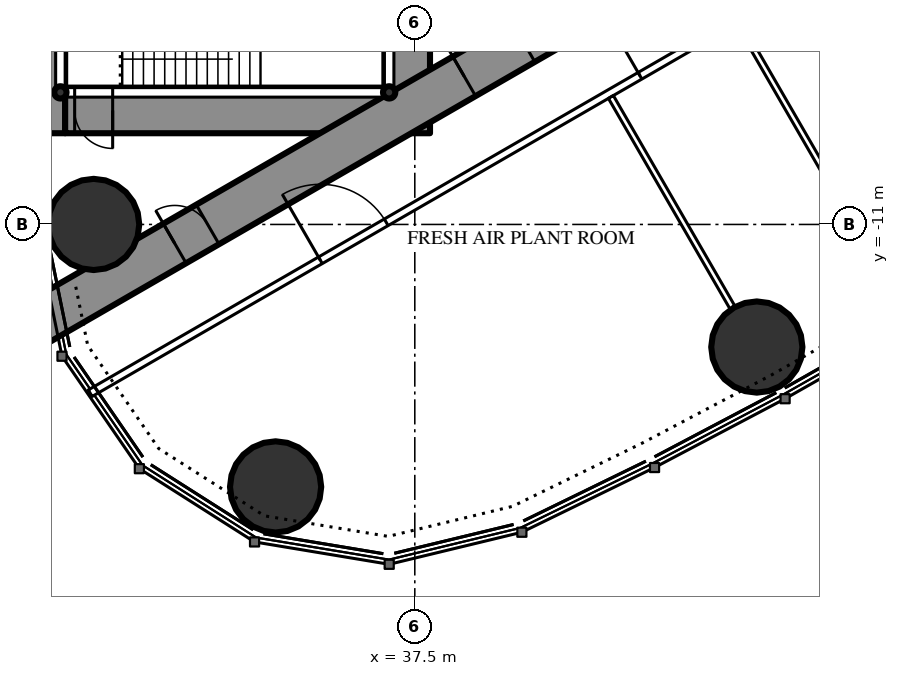
"""IFC4 building model, lengths in metres.
Left out: names, types, materials, properties, quantities, classifications, styles, units other than length and angle.
Written with IfcOpenShell. Run it as: python <this file> out.ifc"""

import sys

from ifc_helpers import new_model, si_unit, direction, frame, frame_2d, origin, origin_2d, place, context, subcontext, project, spatial, rectangle, circle, hollow_circle, extrude, element, fill, save


model = new_model("IFC4")
c1 = context("Model", 3, precision=1e-05, world=origin(), true_north=direction((0.0, 1.0)))
c2 = subcontext(c1, "Body", "Model", "MODEL_VIEW")
j1 = project(units=[si_unit("LENGTHUNIT", "METRE"), si_unit("PLANEANGLEUNIT", "RADIAN")], contexts=[c1])
p1 = place(None, origin())
s1 = spatial("IfcSite", under=j1, at=p1, CompositionType="ELEMENT")
p2 = place(p1, origin())
s2 = spatial("IfcBuilding", under=s1, at=p2, CompositionType="ELEMENT")
p3 = place(p2, frame((0.0, 0.0, 268.3)))
s3 = spatial("IfcBuildingStorey", under=s2, at=p3, CompositionType="ELEMENT", Elevation=268.3)
for number, where, z_axis, x_axis in (
    (1, (33.837, -17.906, 0.0), (0.0, 0.0, 1.0), (1.0, 0.0, 0.0)),
    (2, (29.05, -11.0, 0.0), (0.0, 0.0, 1.0), (1.0, 0.0, 0.0)),
    (3, (46.499, -14.226, 0.0), (0.0, 0.0, 1.0), (1.0, 0.0, 0.0)),
):
    element("IfcColumn", number, at=place(p3, frame(where, z_axis=z_axis, x_axis=x_axis)), inside=s3, PredefinedType="COLUMN", context=c2, shape_type="SweptSolid", body=[
        extrude(circle(Radius=1.2, at=origin_2d()), origin(), (0.0, 0.0, 1.0), 5.0),
    ])
p4 = place(p3, frame((27.9, -8.6, 0.0), z_axis=(0.0, 0.0, 1.0), x_axis=(0.0, 1.0, 0.0)))
e4 = element("IfcWall", 4, at=p4, inside=s3, PredefinedType="SHEAR", context=c2, shape_type="SweptSolid", body=[
    extrude(rectangle(XDim=17.2, YDim=0.8, at=frame_2d((8.6, 0.0))), origin(), (0.0, 0.0, 1.0), 5.0),
])
p5 = place(p4, frame((9.35, 0.0, 0.0)))
e5 = element("IfcOpeningElement", 5, at=p5, cuts=e4, PredefinedType="OPENING", context=c2, shape_type="SweptSolid", body=[
    extrude(rectangle(XDim=0.9, YDim=2.2, at=frame_2d((0.45, 1.1))), frame((0.0, 0.41, 0.0), z_axis=(0.0, -1.0, 0.0), x_axis=(1.0, 0.0, 0.0)), (0.0, 0.0, 1.0), 0.82),
])
p6 = place(p3, frame((37.3, -8.6, 0.0), z_axis=(0.0, 0.0, 1.0), x_axis=(0.0, 1.0, 0.0)))
e6 = element("IfcWall", 6, at=p6, inside=s3, PredefinedType="SHEAR", context=c2, shape_type="SweptSolid", body=[
    extrude(rectangle(XDim=17.2, YDim=1.2, at=frame_2d((8.6, 0.0))), origin(), (0.0, 0.0, 1.0), 5.0),
])
p7 = place(p6, frame((7.7, 0.0, 0.0)))
e7 = element("IfcOpeningElement", 7, at=p7, cuts=e6, PredefinedType="OPENING", context=c2, shape_type="SweptSolid", body=[
    extrude(rectangle(XDim=1.8, YDim=2.2, at=frame_2d((0.9, 1.1))), frame((0.0, 0.61, 0.0), z_axis=(0.0, -1.0, 0.0), x_axis=(1.0, 0.0, 0.0)), (0.0, 0.0, 1.0), 1.22),
])
p8 = place(p3, frame((28.3, -8.0, 0.0), z_axis=(0.0, 0.0, 1.0), x_axis=(1.0, 0.0, 0.0)))
e8 = element("IfcWall", 8, at=p8, inside=s3, PredefinedType="SHEAR", context=c2, shape_type="SweptSolid", body=[
    extrude(rectangle(XDim=8.4, YDim=1.2, at=frame_2d((4.2, 0.0))), origin(), (0.0, 0.0, 1.0), 5.0),
])
p9 = place(p8, frame((0.25, 0.0, 0.0)))
e9 = element("IfcOpeningElement", 9, at=p9, cuts=e8, PredefinedType="OPENING", context=c2, shape_type="SweptSolid", body=[
    extrude(rectangle(XDim=1.0, YDim=2.2, at=frame_2d((0.5, 1.1))), frame((0.0, 0.61, 0.0), z_axis=(0.0, -1.0, 0.0), x_axis=(1.0, 0.0, 0.0)), (0.0, 0.0, 1.0), 1.22),
])
p10 = place(p3, frame((27.2, -13.8, 0.0), z_axis=(0.0, 0.0, 1.0), x_axis=(0.866027159892, 0.499996958321, 0.0)))
e10 = element("IfcWall", 10, at=p10, inside=s3, PredefinedType="SHEAR", context=c2, shape_type="SweptSolid", body=[
    extrude(rectangle(XDim=27.947, YDim=1.2, at=frame_2d((13.973, 0.0))), origin(), (0.0, 0.0, 1.0), 5.0),
])
p11 = place(p10, frame((4.6, 0.0, 0.0)))
e11 = element("IfcOpeningElement", 11, at=p11, cuts=e10, PredefinedType="OPENING", context=c2, shape_type="SweptSolid", body=[
    extrude(rectangle(XDim=1.0, YDim=2.2, at=frame_2d((0.5, 1.1))), frame((0.0, 0.61, 0.0), z_axis=(0.0, -1.0, 0.0), x_axis=(1.0, 0.0, 0.0)), (0.0, 0.0, 1.0), 1.22),
])
p12 = place(p10, frame((13.395, 0.0, 0.0)))
e12 = element("IfcOpeningElement", 12, at=p12, cuts=e10, PredefinedType="OPENING", context=c2, shape_type="SweptSolid", body=[
    extrude(rectangle(XDim=1.8, YDim=2.2, at=frame_2d((0.9, 1.1))), frame((0.0, 0.61, 0.0), z_axis=(0.0, -1.0, 0.0), x_axis=(1.0, 0.0, 0.0)), (0.0, 0.0, 1.0), 1.22),
])
for number, where, z_axis, x_axis in (
    (13, (28.175, -7.525, 5.0), (0.0, 0.0, 1.0), (1.0, 0.0, 0.0)),
    (14, (36.825, -7.525, 5.0), (0.0, 0.0, 1.0), (1.0, 0.0, 0.0)),
):
    element("IfcColumn", number, at=place(p3, frame(where, z_axis=z_axis, x_axis=x_axis)), inside=s3, PredefinedType="COLUMN", context=c2, shape_type="SweptSolid", body=[
        extrude(hollow_circle(Radius=0.162, WallThickness=0.012, at=origin_2d()), origin(), (0.0, 0.0, 1.0), 3.0),
    ])
for number, where, z_axis, x_axis in (
    (15, (28.175, -7.422, 5.0), (0.0, 0.0, 1.0), (0.0, 1.0, 0.0)),
    (16, (36.825, -7.422, 5.0), (0.0, 0.0, 1.0), (0.0, 1.0, 0.0)),
):
    element("IfcWall", number, at=place(p3, frame(where, z_axis=z_axis, x_axis=x_axis)), inside=s3, PredefinedType="SOLIDWALL", context=c2, shape_type="SweptSolid", body=[
        extrude(rectangle(XDim=3.144, YDim=0.25, at=frame_2d((1.572, 0.0))), origin(), (0.0, 0.0, 1.0), 2.54),
    ])
p13 = place(p3, frame((28.278, -7.525, 5.0), z_axis=(0.0, 0.0, 1.0), x_axis=(1.0, 0.0, 0.0)))
e17 = element("IfcWall", 17, at=p13, inside=s3, PredefinedType="SOLIDWALL", context=c2, shape_type="SweptSolid", body=[
    extrude(rectangle(XDim=8.444, YDim=0.25, at=frame_2d((4.222, 0.0))), origin(), (0.0, 0.0, 1.0), 2.54),
])
p14 = place(p3, frame((28.959, -15.44, 0.0), z_axis=(0.0, 0.0, 1.0), x_axis=(0.866025227435, 0.500000305447, 0.0)))
e18 = element("IfcWall", 18, at=p14, inside=s3, PredefinedType="PARTITIONING", context=c2, shape_type="SweptSolid", body=[
    extrude(rectangle(XDim=30.88, YDim=0.2, at=frame_2d((15.44, 0.0))), origin(), (0.0, 0.0, 1.0), 4.7),
])
p15 = place(p14, frame((6.994, 0.0, 0.0)))
e19 = element("IfcOpeningElement", 19, at=p15, cuts=e18, PredefinedType="OPENING", context=c2, shape_type="SweptSolid", body=[
    extrude(rectangle(XDim=2.0, YDim=2.4, at=frame_2d((1.0, 1.2))), frame((0.0, 0.11, 0.0), z_axis=(0.0, -1.0, 0.0), x_axis=(1.0, 0.0, 0.0)), (0.0, 0.0, 1.0), 0.22),
])
p16 = place(p14, frame((16.704, 0.0, 0.0)))
e20 = element("IfcOpeningElement", 20, at=p16, cuts=e18, PredefinedType="OPENING", context=c2, shape_type="SweptSolid", body=[
    extrude(rectangle(XDim=2.0, YDim=2.4, at=frame_2d((1.0, 1.2))), frame((0.0, 0.11, 0.0), z_axis=(0.0, -1.0, 0.0), x_axis=(1.0, 0.0, 0.0)), (0.0, 0.0, 1.0), 0.22),
])
p17 = place(p14, frame((20.587, 0.0, 0.0)))
e21 = element("IfcOpeningElement", 21, at=p17, cuts=e18, PredefinedType="OPENING", context=c2, shape_type="SweptSolid", body=[
    extrude(rectangle(XDim=2.0, YDim=2.4, at=frame_2d((1.0, 1.2))), frame((0.0, 0.11, 0.0), z_axis=(0.0, -1.0, 0.0), x_axis=(1.0, 0.0, 0.0)), (0.0, 0.0, 1.0), 0.22),
])
p18 = place(p14, frame((26.092, 0.0, 0.0)))
e22 = element("IfcOpeningElement", 22, at=p18, cuts=e18, PredefinedType="OPENING", context=c2, shape_type="SweptSolid", body=[
    extrude(rectangle(XDim=2.0, YDim=2.4, at=frame_2d((1.0, 1.2))), frame((0.0, 0.11, 0.0), z_axis=(0.0, -1.0, 0.0), x_axis=(1.0, 0.0, 0.0)), (0.0, 0.0, 1.0), 0.22),
])
p19 = place(p3, frame((42.66, -7.646, 0.0), z_axis=(0.0, 0.0, 1.0), x_axis=(0.499996592859, -0.866027370889, 0.0)))
e23 = element("IfcWall", 23, at=p19, inside=s3, PredefinedType="PARTITIONING", context=c2, shape_type="SweptSolid", body=[
    extrude(rectangle(XDim=6.398, YDim=0.15, at=frame_2d((3.199, 0.0))), origin(), (0.0, 0.0, 1.0), 3.8),
])
p20 = place(p3, frame((46.023, -5.704, 0.0), z_axis=(0.0, 0.0, 1.0), x_axis=(0.499984478165, -0.866034365135, 0.0)))
e24 = element("IfcWall", 24, at=p20, inside=s3, PredefinedType="PARTITIONING", context=c2, shape_type="SweptSolid", body=[
    extrude(rectangle(XDim=6.426, YDim=0.15, at=frame_2d((3.213, 0.0))), origin(), (0.0, 0.0, 1.0), 3.8),
])
p21 = place(p15, origin())
e25 = element("IfcDoor", 25, at=p21, inside=s3, OperationType="DOUBLE_DOOR_SINGLE_SWING", PredefinedType="DOOR", context=c2, shape_type="SweptSolid", body=[
    extrude(rectangle(XDim=2.0, YDim=2.4, at=frame_2d((1.0, 1.2))), frame((0.0, 0.025, 0.0), z_axis=(0.0, -1.0, 0.0), x_axis=(1.0, 0.0, 0.0)), (0.0, 0.0, 1.0), 0.05),
])
fill(e19, e25)
p22 = place(p16, origin())
e26 = element("IfcDoor", 26, at=p22, inside=s3, OperationType="DOUBLE_DOOR_SINGLE_SWING", PredefinedType="DOOR", context=c2, shape_type="SweptSolid", body=[
    extrude(rectangle(XDim=2.0, YDim=2.4, at=frame_2d((1.0, 1.2))), frame((0.0, 0.025, 0.0), z_axis=(0.0, -1.0, 0.0), x_axis=(1.0, 0.0, 0.0)), (0.0, 0.0, 1.0), 0.05),
])
fill(e20, e26)
p23 = place(p11, origin())
e27 = element("IfcDoor", 27, at=p23, inside=s3, OperationType="SINGLE_SWING_LEFT", PredefinedType="DOOR", context=c2, shape_type="SweptSolid", body=[
    extrude(rectangle(XDim=1.0, YDim=2.2, at=frame_2d((0.5, 1.1))), frame((0.0, 0.025, 0.0), z_axis=(0.0, -1.0, 0.0), x_axis=(1.0, 0.0, 0.0)), (0.0, 0.0, 1.0), 0.05),
])
fill(e11, e27)
p24 = place(p12, origin())
e28 = element("IfcDoor", 28, at=p24, inside=s3, OperationType="DOUBLE_DOOR_SINGLE_SWING", PredefinedType="DOOR", context=c2, shape_type="SweptSolid", body=[
    extrude(rectangle(XDim=1.8, YDim=2.2, at=frame_2d((0.9, 1.1))), frame((0.0, 0.025, 0.0), z_axis=(0.0, -1.0, 0.0), x_axis=(1.0, 0.0, 0.0)), (0.0, 0.0, 1.0), 0.05),
])
fill(e12, e28)
p25 = place(p9, origin())
e29 = element("IfcDoor", 29, at=p25, inside=s3, OperationType="SINGLE_SWING_RIGHT", PredefinedType="DOOR", context=c2, shape_type="SweptSolid", body=[
    extrude(rectangle(XDim=1.0, YDim=2.2, at=frame_2d((0.5, 1.1))), frame((0.0, 0.025, 0.0), z_axis=(0.0, -1.0, 0.0), x_axis=(1.0, 0.0, 0.0)), (0.0, 0.0, 1.0), 0.05),
])
fill(e9, e29)
save(model, sys.argv[1])
